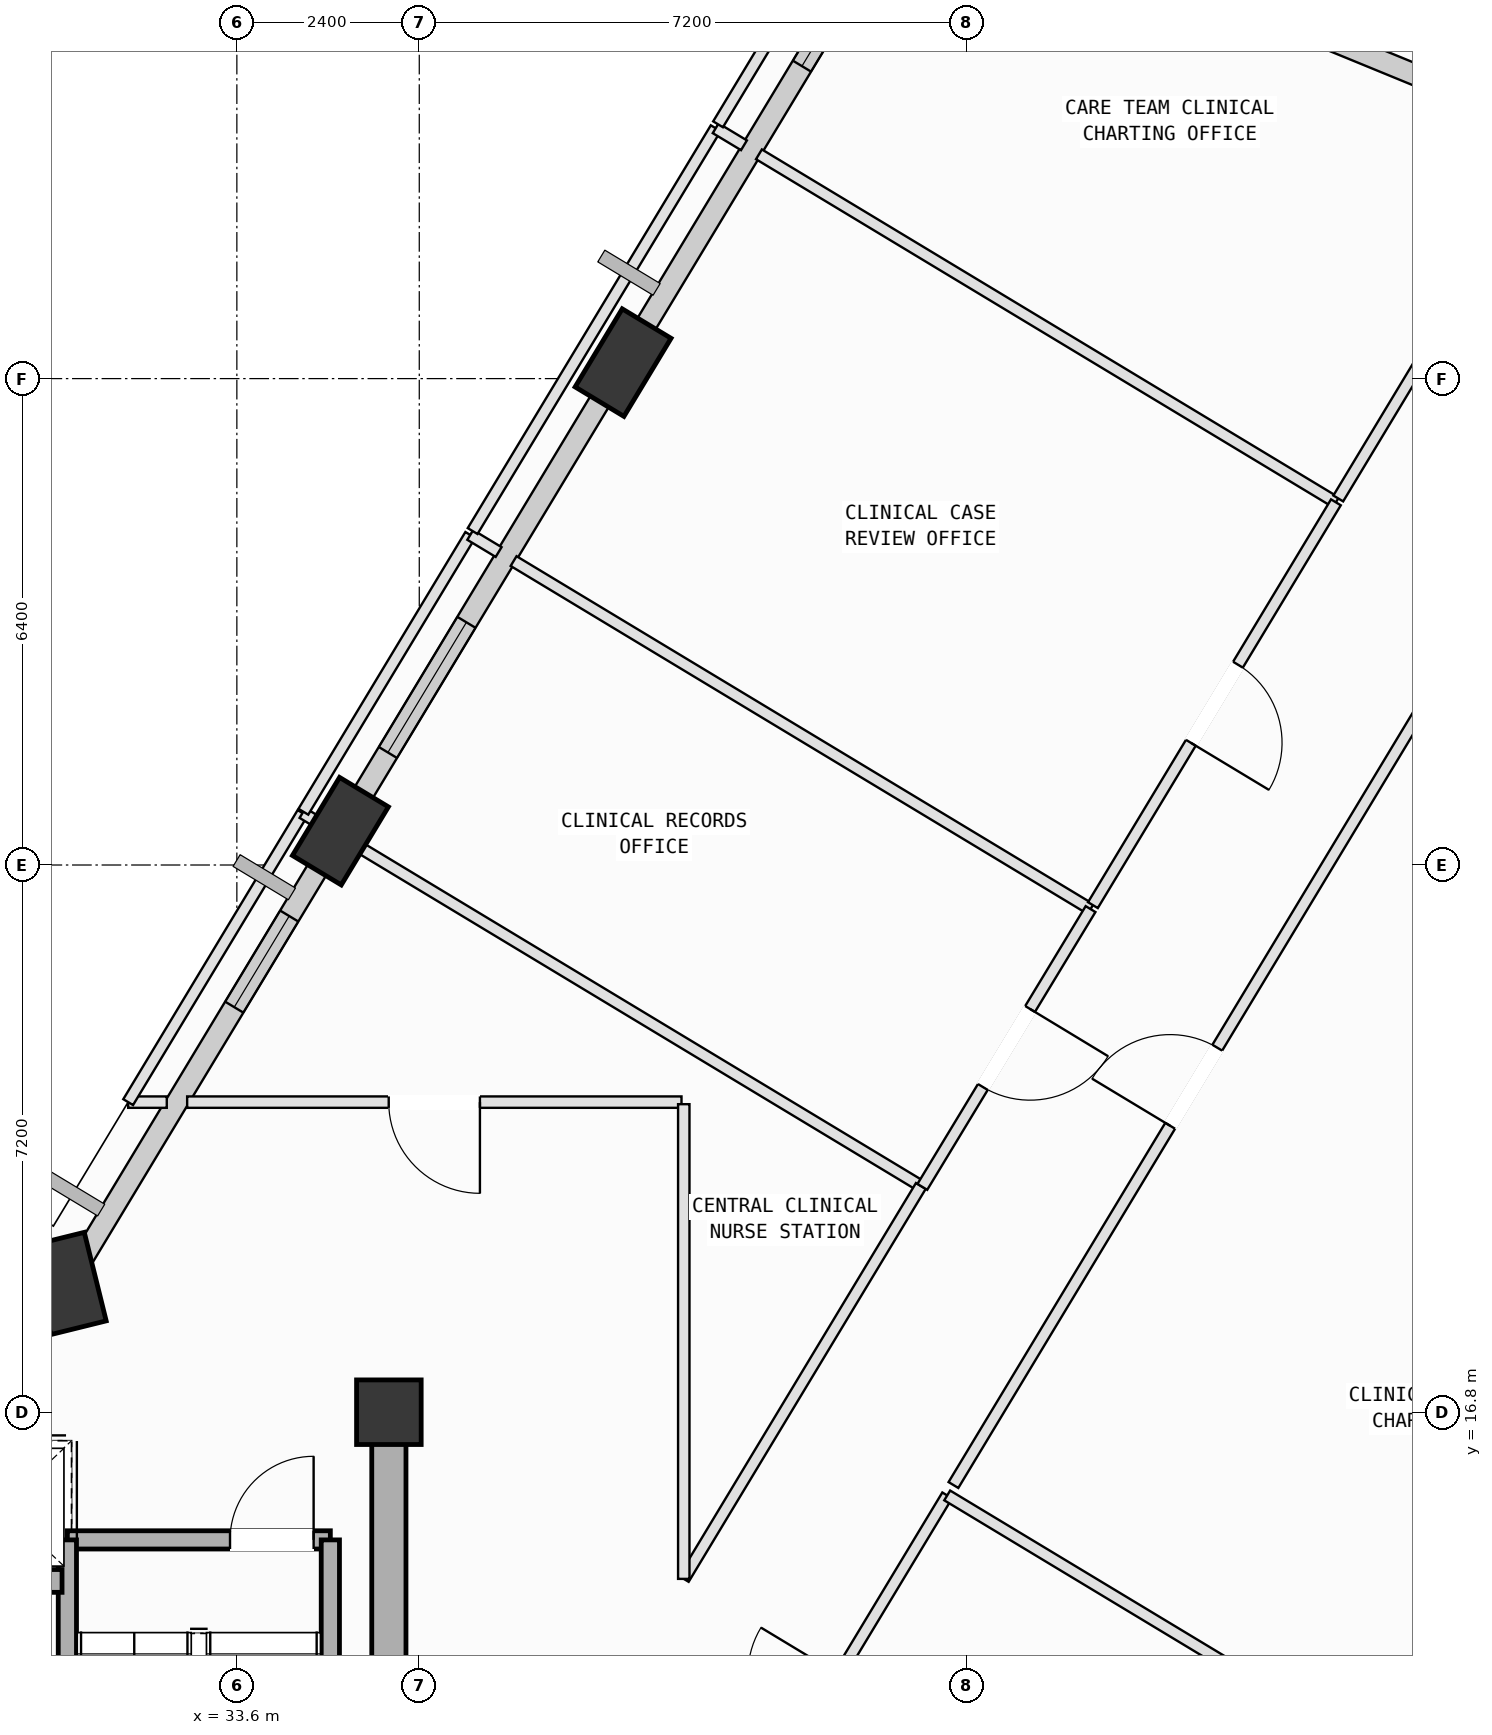
"""IFC4 building model, lengths in metres.
Left out: names, types, materials, properties, quantities, classifications, styles, units other than length and angle.
Written with IfcOpenShell. Run it as: python <this file> out.ifc"""

import sys

from ifc_helpers import new_model, si_unit, direction, frame, frame_2d, origin, origin_2d, place, context, subcontext, project, spatial, rectangle, extrude, element, fill, save


model = new_model("IFC4")
c1 = context("Model", 3, precision=1e-05, world=origin(), true_north=direction((0.0, 1.0)))
c2 = subcontext(c1, "Body", "Model", "MODEL_VIEW")
j1 = project(units=[si_unit("LENGTHUNIT", "METRE"), si_unit("PLANEANGLEUNIT", "RADIAN")], contexts=[c1])
p1 = place(None, origin())
s1 = spatial("IfcSite", under=j1, at=p1, CompositionType="ELEMENT")
p2 = place(p1, origin())
s2 = spatial("IfcBuilding", under=s1, at=p2, CompositionType="ELEMENT")
p3 = place(p2, frame((0.0, 0.0, 276.6)))
s3 = spatial("IfcBuildingStorey", under=s2, at=p3, CompositionType="ELEMENT", Elevation=276.6)
p4 = place(p3, frame((35.6, 16.8, 0.0), z_axis=(0.0, 0.0, 1.0), x_axis=(1.0, 0.0, 0.0)))
e1 = element("IfcColumn", 1, at=p4, inside=s3, PredefinedType="COLUMN", context=c2, shape_type="SweptSolid", body=[
    extrude(rectangle(XDim=0.85, YDim=0.85, at=origin_2d()), origin(), (0.0, 0.0, 1.0), 4.0),
])
p5 = place(p3, frame((38.682, 30.61, 0.002), z_axis=(-0.024240744418, 0.020882454889, 0.999488023634), x_axis=(0.311279551422, -0.949923406253, 0.027396407041)))
e2 = element("IfcColumn", 2, at=p5, inside=s3, PredefinedType="COLUMN", context=c2, shape_type="SweptSolid", body=[
    extrude(rectangle(XDim=1.2, YDim=0.75, at=origin_2d()), origin(), (0.0, 0.0, 1.0), 3.998),
])
p6 = place(p3, frame((34.963, 24.445, 0.002), z_axis=(0.001405071418, 0.005620285671, 0.999983218941), x_axis=(-0.708782722626, -0.705409416433, 0.004960576024)))
e3 = element("IfcColumn", 3, at=p6, inside=s3, PredefinedType="COLUMN", context=c2, shape_type="SweptSolid", body=[
    extrude(rectangle(XDim=1.2, YDim=0.75, at=origin_2d()), origin(), (0.0, 0.0, 1.0), 3.996),
])
p7 = place(p3, frame((31.373, 18.494, 0.002), z_axis=(0.026198010128, -0.009038008156, 0.999615915577), x_axis=(-0.995635940105, 0.089360928723, 0.026901657753)))
e4 = element("IfcColumn", 4, at=p7, inside=s3, PredefinedType="COLUMN", context=c2, shape_type="SweptSolid", body=[
    extrude(rectangle(XDim=1.2, YDim=0.75, at=origin_2d()), origin(), (0.0, 0.0, 1.0), 3.998),
])
p8 = place(p3, frame((42.835, 36.971, 0.0), z_axis=(0.0, 0.0, 1.0), x_axis=(0.925149642296, -0.379602607157, 0.0)))
e5 = element("IfcWall", 5, at=p8, inside=s3, PredefinedType="SOLIDWALL", context=c2, shape_type="SweptSolid", body=[
    extrude(rectangle(XDim=9.036, YDim=0.28, at=frame_2d((4.518, 0.0))), origin(), (0.0, 0.0, 1.0), 3.265),
])
p9 = place(p3, frame((38.89, 30.956, 0.0), z_axis=(0.0, 0.0, 1.0), x_axis=(0.516522507193, 0.856273612558, 0.0)))
e6 = element("IfcWall", 6, at=p9, inside=s3, PredefinedType="SOLIDWALL", context=c2, shape_type="SweptSolid", body=[
    extrude(rectangle(XDim=6.78, YDim=0.28, at=frame_2d((3.39, 0.0))), origin(), (0.0, 0.0, 1.0), 3.265),
])
p10 = place(p9, frame((4.153, 0.0, 0.75)))
e7 = element("IfcOpeningElement", 7, at=p10, cuts=e6, PredefinedType="OPENING", context=c2, shape_type="SweptSolid", body=[
    extrude(rectangle(XDim=1.6, YDim=1.95, at=frame_2d((0.8, 0.975))), frame((0.0, 0.15, 0.0), z_axis=(0.0, -1.0, 0.0), x_axis=(1.0, 0.0, 0.0)), (0.0, 0.0, 1.0), 0.3),
])
p11 = place(p3, frame((35.174, 24.795, 0.0), z_axis=(0.0, 0.0, 1.0), x_axis=(0.51653883109, 0.856263765423, 0.0)))
e8 = element("IfcWall", 8, at=p11, inside=s3, PredefinedType="SOLIDWALL", context=c2, shape_type="SweptSolid", body=[
    extrude(rectangle(XDim=6.41, YDim=0.28, at=frame_2d((3.205, 0.0))), origin(), (0.0, 0.0, 1.0), 3.265),
])
p12 = place(p11, frame((0.801, 0.0, 0.75)))
e9 = element("IfcOpeningElement", 9, at=p12, cuts=e8, PredefinedType="OPENING", context=c2, shape_type="SweptSolid", body=[
    extrude(rectangle(XDim=2.0, YDim=1.95, at=frame_2d((1.0, 0.975))), frame((0.0, 0.15, 0.0), z_axis=(0.0, -1.0, 0.0), x_axis=(1.0, 0.0, 0.0)), (0.0, 0.0, 1.0), 0.3),
])
p13 = place(p3, frame((31.582, 18.841, 0.0), z_axis=(0.0, 0.0, 1.0), x_axis=(0.516523161172, 0.856273218064, 0.0)))
e10 = element("IfcWall", 10, at=p13, inside=s3, PredefinedType="SOLIDWALL", context=c2, shape_type="SweptSolid", body=[
    extrude(rectangle(XDim=6.158, YDim=0.28, at=frame_2d((3.079, 0.0))), origin(), (0.0, 0.0, 1.0), 3.265),
])
p14 = place(p13, frame((3.84, 0.0, 0.75)))
e11 = element("IfcOpeningElement", 11, at=p14, cuts=e10, PredefinedType="OPENING", context=c2, shape_type="SweptSolid", body=[
    extrude(rectangle(XDim=1.4, YDim=1.85, at=frame_2d((0.7, 0.925))), frame((0.0, 0.15, 0.0), z_axis=(0.0, -1.0, 0.0), x_axis=(1.0, 0.0, 0.0)), (0.0, 0.0, 1.0), 0.3),
])
p15 = place(p3, frame((31.37, 15.12, 0.0), z_axis=(0.0, 0.0, 1.0), x_axis=(1.0, 0.0, 0.0)))
e12 = element("IfcWall", 12, at=p15, inside=s3, PredefinedType="SOLIDWALL", context=c2, shape_type="SweptSolid", body=[
    extrude(rectangle(XDim=3.46, YDim=0.24, at=frame_2d((1.73, 0.0))), origin(), (0.0, 0.0, 1.0), 3.78),
])
p16 = place(p15, frame((2.14, 0.0, 0.0)))
e13 = element("IfcOpeningElement", 13, at=p16, cuts=e12, PredefinedType="OPENING", context=c2, shape_type="SweptSolid", body=[
    extrude(rectangle(XDim=1.1, YDim=2.15, at=frame_2d((0.55, 1.075))), frame((0.0, 0.13, 0.0), z_axis=(0.0, -1.0, 0.0), x_axis=(1.0, 0.0, 0.0)), (0.0, 0.0, 1.0), 0.26),
])
for number, where, z_axis, x_axis in (
    (14, (34.83, 15.12, 0.0), (0.0, 0.0, 1.0), (0.0, -1.0, 0.0)),
    (15, (31.37, 8.025, 0.0), (0.0, 0.0, 1.0), (0.0, 1.0, 0.0)),
):
    element("IfcWall", number, at=place(p3, frame(where, z_axis=z_axis, x_axis=x_axis)), inside=s3, PredefinedType="SOLIDWALL", context=c2, shape_type="SweptSolid", body=[
        extrude(rectangle(XDim=7.095, YDim=0.24, at=frame_2d((3.548, 0.0))), origin(), (0.0, 0.0, 1.0), 3.78),
    ])
p17 = place(p3, frame((35.6, 7.8, 0.0), z_axis=(0.0, 0.0, 1.0), x_axis=(0.0, 1.0, 0.0)))
e16 = element("IfcWall", 16, at=p17, inside=s3, PredefinedType="SHEAR", context=c2, shape_type="SweptSolid", body=[
    extrude(rectangle(XDim=9.0, YDim=0.45, at=frame_2d((4.5, 0.0))), origin(), (0.0, 0.0, 1.0), 3.78),
])
p18 = place(p3, frame((29.6, 14.58, 0.0), z_axis=(0.0, 0.0, 1.0), x_axis=(1.0, 0.0, 0.0)))
e17 = element("IfcWall", 17, at=p18, inside=s3, PredefinedType="SOLIDWALL", context=c2, shape_type="SweptSolid", body=[
    extrude(rectangle(XDim=1.7, YDim=0.3, at=frame_2d((0.85, 0.0))), origin(), (0.0, 0.0, 1.0), 3.78),
])
p19 = place(p18, frame((0.34, 0.0, 0.0)))
e18 = element("IfcOpeningElement", 18, at=p19, cuts=e17, PredefinedType="OPENING", context=c2, shape_type="SweptSolid", body=[
    extrude(rectangle(XDim=1.12, YDim=2.15, at=frame_2d((0.56, 1.075))), frame((0.0, 0.16, 0.0), z_axis=(0.0, -1.0, 0.0), x_axis=(1.0, 0.0, 0.0)), (0.0, 0.0, 1.0), 0.32),
])
p20 = place(p3, frame((39.48, 9.96, 0.0), z_axis=(0.0, 0.0, 1.0), x_axis=(0.516575747775, 0.856241494446, 0.0)))
e19 = element("IfcWall", 19, at=p20, inside=s3, PredefinedType="PARTITIONING", context=c2, shape_type="SweptSolid", body=[
    extrude(rectangle(XDim=6.71, YDim=0.15, at=frame_2d((3.355, 0.0))), origin(), (0.0, 0.0, 1.0), 3.78),
])
p21 = place(p20, frame((2.755, 0.0, 0.0)))
e20 = element("IfcOpeningElement", 20, at=p21, cuts=e19, PredefinedType="OPENING", context=c2, shape_type="SweptSolid", body=[
    extrude(rectangle(XDim=1.2, YDim=2.15, at=frame_2d((0.6, 1.075))), frame((0.0, 0.085, 0.0), z_axis=(0.0, -1.0, 0.0), x_axis=(1.0, 0.0, 0.0)), (0.0, 0.0, 1.0), 0.17),
])
p22 = place(p3, frame((42.946, 15.705, 0.0), z_axis=(0.0, 0.0, 1.0), x_axis=(0.85631180797, -0.516459182831, 0.0)))
e21 = element("IfcWall", 21, at=p22, inside=s3, PredefinedType="PARTITIONING", context=c2, shape_type="SweptSolid", body=[
    extrude(rectangle(XDim=9.447, YDim=0.15, at=frame_2d((4.724, 0.0))), origin(), (0.0, 0.0, 1.0), 3.78),
])
p23 = place(p3, frame((43.028, 15.842, 0.0), z_axis=(0.0, 0.0, 1.0), x_axis=(0.516562112888, 0.856249720309, 0.0)))
e22 = element("IfcWall", 22, at=p23, inside=s3, PredefinedType="PARTITIONING", context=c2, shape_type="SweptSolid", body=[
    extrude(rectangle(XDim=12.24, YDim=0.15, at=frame_2d((6.12, 0.0))), origin(), (0.0, 0.0, 1.0), 3.415),
])
p24 = place(p23, frame((5.52, 0.0, 0.0)))
e23 = element("IfcOpeningElement", 23, at=p24, cuts=e22, PredefinedType="OPENING", context=c2, shape_type="SweptSolid", body=[
    extrude(rectangle(XDim=1.2, YDim=2.15, at=frame_2d((0.6, 1.075))), frame((0.0, 0.085, 0.0), z_axis=(0.0, -1.0, 0.0), x_axis=(1.0, 0.0, 0.0)), (0.0, 0.0, 1.0), 0.17),
])
p25 = place(p3, frame((39.45, 20.88, 0.0), z_axis=(0.0, 0.0, 1.0), x_axis=(-1.0, 0.0, 0.0)))
e24 = element("IfcWall", 24, at=p25, inside=s3, PredefinedType="PARTITIONING", context=c2, shape_type="SweptSolid", body=[
    extrude(rectangle(XDim=6.504, YDim=0.15, at=frame_2d((3.252, 0.0))), origin(), (0.0, 0.0, 1.0), 3.415),
])
p26 = place(p25, frame((2.652, 0.0, 0.0)))
e25 = element("IfcOpeningElement", 25, at=p26, cuts=e24, PredefinedType="OPENING", context=c2, shape_type="SweptSolid", body=[
    extrude(rectangle(XDim=1.2, YDim=2.15, at=frame_2d((0.6, 1.075))), frame((0.0, 0.085, 0.0), z_axis=(0.0, -1.0, 0.0), x_axis=(1.0, 0.0, 0.0)), (0.0, 0.0, 1.0), 0.17),
])
p27 = place(p3, frame((32.678, 20.88, 0.0), z_axis=(0.0, 0.0, 1.0), x_axis=(-1.0, 0.0, 0.0)))
e26 = element("IfcWall", 26, at=p27, inside=s3, PredefinedType="PARTITIONING", context=c2, shape_type="SweptSolid", body=[
    extrude(rectangle(XDim=0.508, YDim=0.15, at=frame_2d((0.254, 0.0))), origin(), (0.0, 0.0, 1.0), 3.78),
])
p28 = place(p3, frame((32.17, 20.88, 0.0), z_axis=(0.0, 0.0, 1.0), x_axis=(0.516426008646, 0.856331815124, 0.0)))
e27 = element("IfcWall", 27, at=p28, inside=s3, PredefinedType="PARTITIONING", context=c2, shape_type="SweptSolid", body=[
    extrude(rectangle(XDim=4.442, YDim=0.15, at=frame_2d((2.221, 0.0))), origin(), (0.0, 0.0, 1.0), 3.78),
])
p29 = place(p3, frame((34.464, 24.684, 0.0), z_axis=(0.0, 0.0, 1.0), x_axis=(0.856284272725, -0.516504834714, 0.0)))
e28 = element("IfcWall", 28, at=p29, inside=s3, PredefinedType="PARTITIONING", context=c2, shape_type="SweptSolid", body=[
    extrude(rectangle(XDim=9.5, YDim=0.15, at=frame_2d((4.75, 0.0))), origin(), (0.0, 0.0, 1.0), 3.78),
])
p30 = place(p3, frame((42.599, 19.777, 0.0), z_axis=(0.0, 0.0, 1.0), x_axis=(-0.516569402647, -0.856245322468, 0.0)))
e29 = element("IfcWall", 29, at=p30, inside=s3, PredefinedType="PARTITIONING", context=c2, shape_type="SweptSolid", body=[
    extrude(rectangle(XDim=6.038, YDim=0.15, at=frame_2d((3.019, 0.0))), origin(), (0.0, 0.0, 1.0), 3.78),
])
p31 = place(p3, frame((39.48, 14.607, 0.0), z_axis=(0.0, 0.0, 1.0), x_axis=(0.0, 1.0, 0.0)))
e30 = element("IfcWall", 30, at=p31, inside=s3, PredefinedType="PARTITIONING", context=c2, shape_type="SweptSolid", body=[
    extrude(rectangle(XDim=6.246, YDim=0.15, at=frame_2d((3.123, 0.0))), origin(), (0.0, 0.0, 1.0), 3.78),
])
p32 = place(p3, frame((34.475, 24.701, 0.0), z_axis=(0.0, 0.0, 1.0), x_axis=(0.516318106957, 0.856396877872, 0.0)))
e31 = element("IfcWall", 31, at=p32, inside=s3, PredefinedType="PARTITIONING", context=c2, shape_type="SweptSolid", body=[
    extrude(rectangle(XDim=4.253, YDim=0.15, at=frame_2d((2.126, 0.0))), origin(), (0.0, 0.0, 1.0), 3.78),
])
p33 = place(p3, frame((36.671, 28.343, 0.0), z_axis=(0.0, 0.0, 1.0), x_axis=(0.856204755406, -0.516636639061, 0.0)))
e32 = element("IfcWall", 32, at=p33, inside=s3, PredefinedType="PARTITIONING", context=c2, shape_type="SweptSolid", body=[
    extrude(rectangle(XDim=0.436, YDim=0.15, at=frame_2d((0.218, 0.0))), origin(), (0.0, 0.0, 1.0), 3.78),
])
p34 = place(p3, frame((37.241, 27.999, 0.0), z_axis=(0.0, 0.0, 1.0), x_axis=(0.856273135167, -0.516523298594, 0.0)))
e33 = element("IfcWall", 33, at=p34, inside=s3, PredefinedType="PARTITIONING", context=c2, shape_type="SweptSolid", body=[
    extrude(rectangle(XDim=8.865, YDim=0.15, at=frame_2d((4.433, 0.0))), origin(), (0.0, 0.0, 1.0), 3.78),
])
p35 = place(p3, frame((44.832, 23.42, 0.0), z_axis=(0.0, 0.0, 1.0), x_axis=(-0.517953436176, -0.855408813348, 0.0)))
e34 = element("IfcWall", 34, at=p35, inside=s3, PredefinedType="PARTITIONING", context=c2, shape_type="SweptSolid", body=[
    extrude(rectangle(XDim=4.273, YDim=0.15, at=frame_2d((2.136, 0.0))), origin(), (0.0, 0.0, 1.0), 3.78),
])
p36 = place(p35, frame((1.536, 0.0, 0.0)))
e35 = element("IfcOpeningElement", 35, at=p36, cuts=e34, PredefinedType="OPENING", context=c2, shape_type="SweptSolid", body=[
    extrude(rectangle(XDim=1.2, YDim=2.15, at=frame_2d((0.6, 1.075))), frame((0.0, 0.085, 0.0), z_axis=(0.0, -1.0, 0.0), x_axis=(1.0, 0.0, 0.0)), (0.0, 0.0, 1.0), 0.17),
])
p37 = place(p3, frame((36.702, 28.394, 0.0), z_axis=(0.0, 0.0, 1.0), x_axis=(0.51662857817, 0.856209619321, 0.0)))
e36 = element("IfcWall", 36, at=p37, inside=s3, PredefinedType="PARTITIONING", context=c2, shape_type="SweptSolid", body=[
    extrude(rectangle(XDim=6.19, YDim=0.15, at=frame_2d((3.095, 0.0))), origin(), (0.0, 0.0, 1.0), 3.265),
])
p38 = place(p3, frame((39.9, 33.694, 0.0), z_axis=(0.0, 0.0, 1.0), x_axis=(0.856598931091, -0.515982820696, 0.0)))
e37 = element("IfcWall", 37, at=p38, inside=s3, PredefinedType="PARTITIONING", context=c2, shape_type="SweptSolid", body=[
    extrude(rectangle(XDim=0.434, YDim=0.15, at=frame_2d((0.217, 0.0))), origin(), (0.0, 0.0, 1.0), 3.78),
])
p39 = place(p3, frame((40.469, 33.351, 0.0), z_axis=(0.0, 0.0, 1.0), x_axis=(0.856273135167, -0.516523298594, 0.0)))
e38 = element("IfcWall", 38, at=p39, inside=s3, PredefinedType="PARTITIONING", context=c2, shape_type="SweptSolid", body=[
    extrude(rectangle(XDim=8.865, YDim=0.15, at=frame_2d((4.433, 0.0))), origin(), (0.0, 0.0, 1.0), 3.78),
])
p40 = place(p3, frame((48.06, 28.772, 0.0), z_axis=(0.0, 0.0, 1.0), x_axis=(-0.516512910077, -0.85627940167, 0.0)))
e39 = element("IfcWall", 39, at=p40, inside=s3, PredefinedType="PARTITIONING", context=c2, shape_type="SweptSolid", body=[
    extrude(rectangle(XDim=6.19, YDim=0.15, at=frame_2d((3.095, 0.0))), origin(), (0.0, 0.0, 1.0), 3.78),
])
p41 = place(p40, frame((2.495, 0.0, 0.0)))
e40 = element("IfcOpeningElement", 40, at=p41, cuts=e39, PredefinedType="OPENING", context=c2, shape_type="SweptSolid", body=[
    extrude(rectangle(XDim=1.2, YDim=2.15, at=frame_2d((0.6, 1.075))), frame((0.0, 0.085, 0.0), z_axis=(0.0, -1.0, 0.0), x_axis=(1.0, 0.0, 0.0)), (0.0, 0.0, 1.0), 0.17),
])
p42 = place(p3, frame((39.931, 33.746, 0.0), z_axis=(0.0, 0.0, 1.0), x_axis=(0.516609331503, 0.856221232278, 0.0)))
e41 = element("IfcWall", 41, at=p42, inside=s3, PredefinedType="PARTITIONING", context=c2, shape_type="SweptSolid", body=[
    extrude(rectangle(XDim=4.77, YDim=0.15, at=frame_2d((2.385, 0.0))), origin(), (0.0, 0.0, 1.0), 3.265),
])
p43 = place(p3, frame((44.412, 38.271, 0.0), z_axis=(0.0, 0.0, 1.0), x_axis=(0.856315640281, -0.51645282864, 0.0)))
e42 = element("IfcWall", 42, at=p43, inside=s3, PredefinedType="PARTITIONING", context=c2, shape_type="SweptSolid", body=[
    extrude(rectangle(XDim=8.03, YDim=0.15, at=frame_2d((4.015, 0.0))), origin(), (0.0, 0.0, 1.0), 3.265),
])
p44 = place(p3, frame((50.927, 33.526, 0.0), z_axis=(0.0, 0.0, 1.0), x_axis=(-0.516396929878, -0.856349350915, 0.0)))
e43 = element("IfcWall", 43, at=p44, inside=s3, PredefinedType="PARTITIONING", context=c2, shape_type="SweptSolid", body=[
    extrude(rectangle(XDim=5.492, YDim=0.15, at=frame_2d((2.746, 0.0))), origin(), (0.0, 0.0, 1.0), 3.78),
])
p45 = place(p44, frame((2.146, 0.0, 0.0)))
e44 = element("IfcOpeningElement", 44, at=p45, cuts=e43, PredefinedType="OPENING", context=c2, shape_type="SweptSolid", body=[
    extrude(rectangle(XDim=1.2, YDim=2.15, at=frame_2d((0.6, 1.075))), frame((0.0, 0.085, 0.0), z_axis=(0.0, -1.0, 0.0), x_axis=(1.0, 0.0, 0.0)), (0.0, 0.0, 1.0), 0.17),
])
p46 = place(p10, origin())
e45 = element("IfcWindow", 45, at=p46, inside=s3, PartitioningType="SINGLE_PANEL", PredefinedType="WINDOW", context=c2, shape_type="SweptSolid", body=[
    extrude(rectangle(XDim=1.6, YDim=1.95, at=frame_2d((0.8, 0.975))), frame((0.0, 0.03, 0.0), z_axis=(0.0, -1.0, 0.0), x_axis=(1.0, 0.0, 0.0)), (0.0, 0.0, 1.0), 0.06),
])
fill(e7, e45)
p47 = place(p12, origin())
e46 = element("IfcWindow", 46, at=p47, inside=s3, PartitioningType="SINGLE_PANEL", PredefinedType="WINDOW", context=c2, shape_type="SweptSolid", body=[
    extrude(rectangle(XDim=2.0, YDim=1.95, at=frame_2d((1.0, 0.975))), frame((0.0, 0.03, 0.0), z_axis=(0.0, -1.0, 0.0), x_axis=(1.0, 0.0, 0.0)), (0.0, 0.0, 1.0), 0.06),
])
fill(e9, e46)
p48 = place(p14, origin())
e47 = element("IfcWindow", 47, at=p48, inside=s3, PartitioningType="SINGLE_PANEL", PredefinedType="WINDOW", context=c2, shape_type="SweptSolid", body=[
    extrude(rectangle(XDim=1.4, YDim=1.85, at=frame_2d((0.7, 0.925))), frame((0.0, 0.03, 0.0), z_axis=(0.0, -1.0, 0.0), x_axis=(1.0, 0.0, 0.0)), (0.0, 0.0, 1.0), 0.06),
])
fill(e11, e47)
p49 = place(p16, origin())
e48 = element("IfcDoor", 48, at=p49, inside=s3, OperationType="SINGLE_SWING_RIGHT", PredefinedType="DOOR", context=c2, shape_type="SweptSolid", body=[
    extrude(rectangle(XDim=1.1, YDim=2.15, at=frame_2d((0.55, 1.075))), frame((0.0, 0.025, 0.0), z_axis=(0.0, -1.0, 0.0), x_axis=(1.0, 0.0, 0.0)), (0.0, 0.0, 1.0), 0.05),
])
fill(e13, e48)
p50 = place(p24, origin())
e49 = element("IfcDoor", 49, at=p50, inside=s3, OperationType="SINGLE_SWING_LEFT", PredefinedType="DOOR", context=c2, shape_type="SweptSolid", body=[
    extrude(rectangle(XDim=1.2, YDim=2.15, at=frame_2d((0.6, 1.075))), frame((0.0, 0.025, 0.0), z_axis=(0.0, -1.0, 0.0), x_axis=(1.0, 0.0, 0.0)), (0.0, 0.0, 1.0), 0.05),
])
fill(e23, e49)
p51 = place(p26, origin())
e50 = element("IfcDoor", 50, at=p51, inside=s3, OperationType="SINGLE_SWING_LEFT", PredefinedType="DOOR", context=c2, shape_type="SweptSolid", body=[
    extrude(rectangle(XDim=1.2, YDim=2.15, at=frame_2d((0.6, 1.075))), frame((0.0, 0.025, 0.0), z_axis=(0.0, -1.0, 0.0), x_axis=(1.0, 0.0, 0.0)), (0.0, 0.0, 1.0), 0.05),
])
fill(e25, e50)
p52 = place(p36, origin())
e51 = element("IfcDoor", 51, at=p52, inside=s3, OperationType="SINGLE_SWING_LEFT", PredefinedType="DOOR", context=c2, shape_type="SweptSolid", body=[
    extrude(rectangle(XDim=1.2, YDim=2.15, at=frame_2d((0.6, 1.075))), frame((0.0, 0.025, 0.0), z_axis=(0.0, -1.0, 0.0), x_axis=(1.0, 0.0, 0.0)), (0.0, 0.0, 1.0), 0.05),
])
fill(e35, e51)
p53 = place(p41, origin())
e52 = element("IfcDoor", 52, at=p53, inside=s3, OperationType="SINGLE_SWING_RIGHT", PredefinedType="DOOR", context=c2, shape_type="SweptSolid", body=[
    extrude(rectangle(XDim=1.2, YDim=2.15, at=frame_2d((0.6, 1.075))), frame((0.0, 0.025, 0.0), z_axis=(0.0, -1.0, 0.0), x_axis=(1.0, 0.0, 0.0)), (0.0, 0.0, 1.0), 0.05),
])
fill(e40, e52)
save(model, sys.argv[1])
